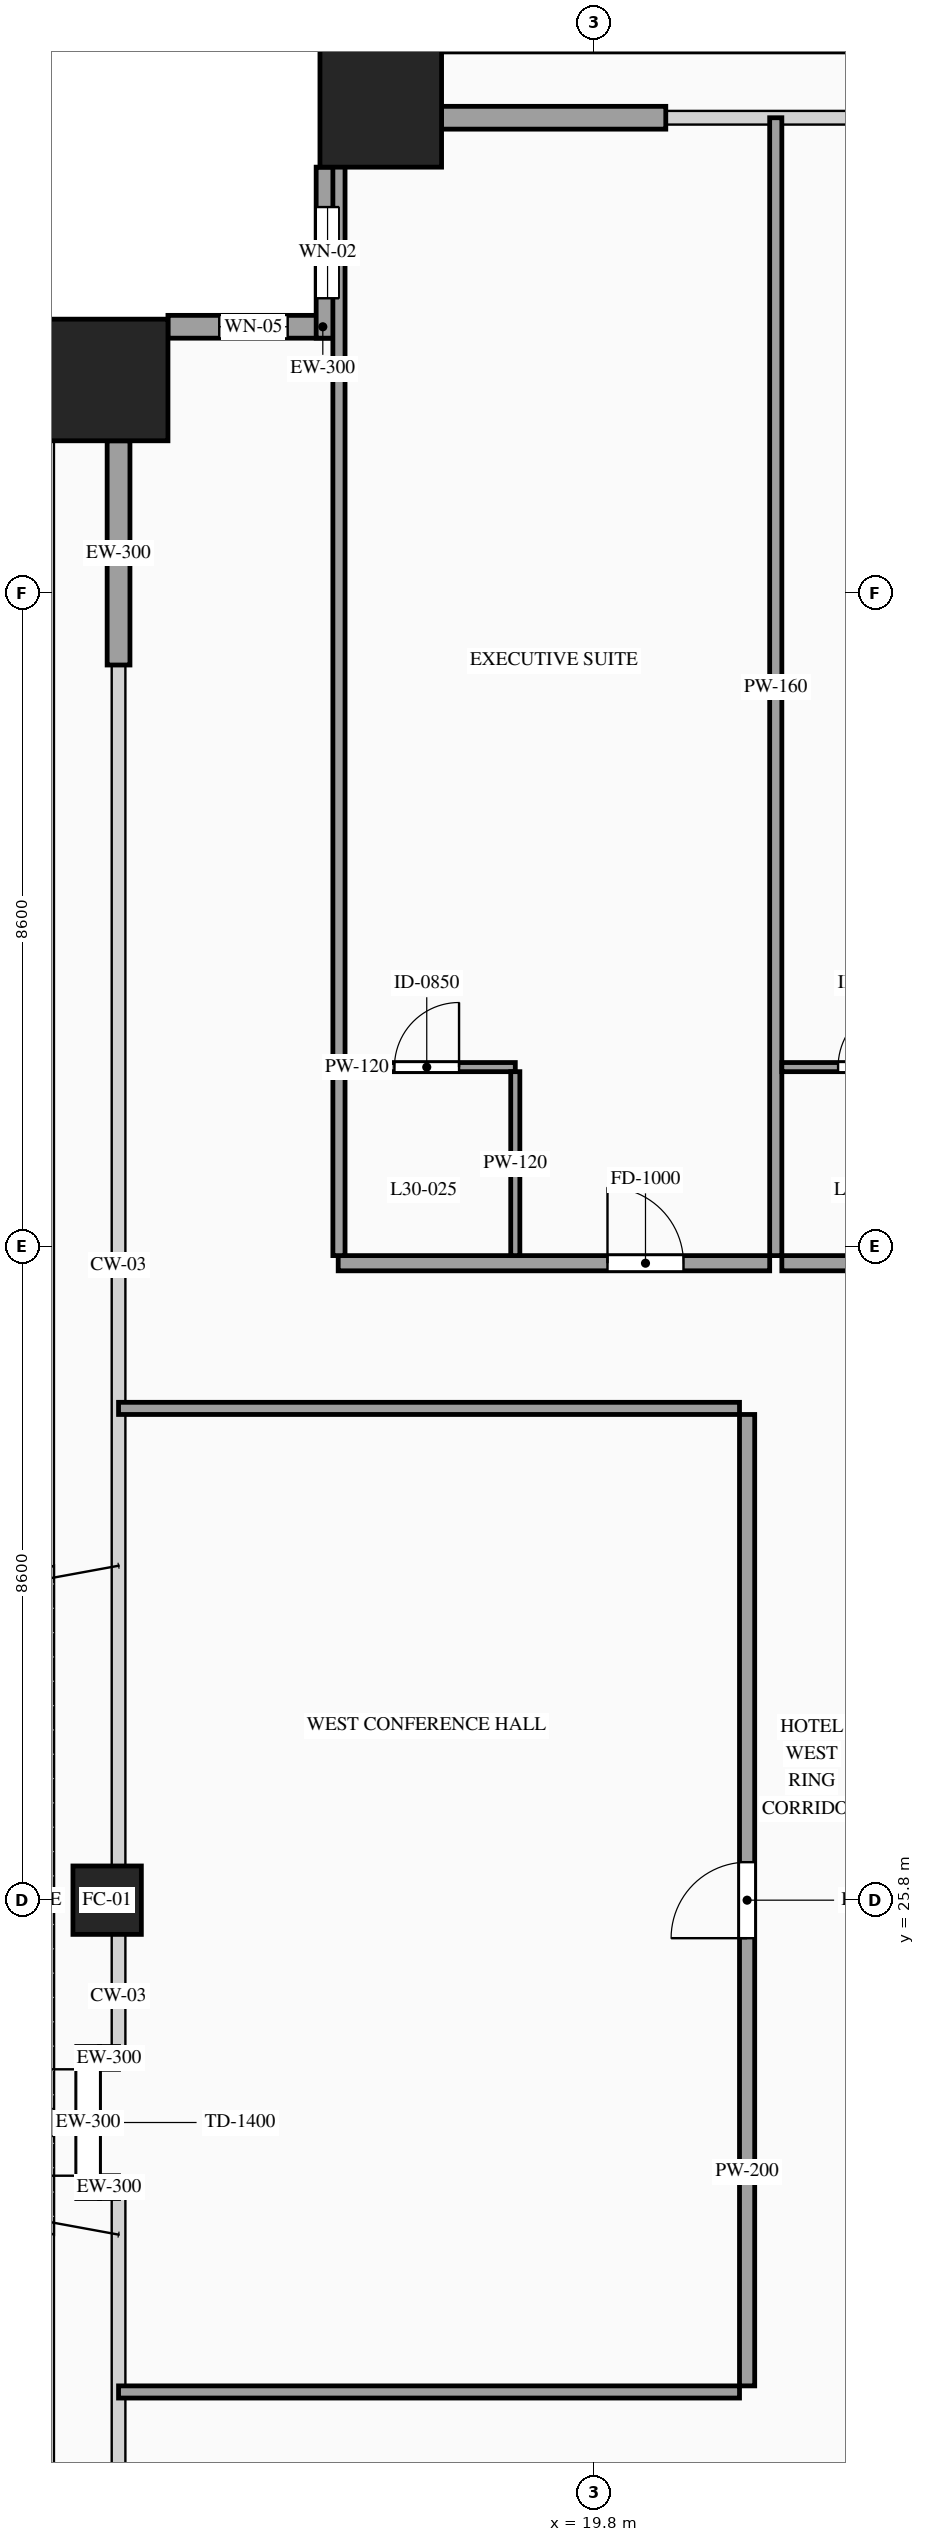
"""IFC4 building model, lengths in metres.
Left out: names, types, materials, properties, quantities, classifications, styles, units other than length and angle.
Written with IfcOpenShell. Run it as: python <this file> out.ifc"""

import sys

from ifc_helpers import new_model, si_unit, direction, frame, frame_2d, origin, origin_2d, place, context, subcontext, project, spatial, rectangle, hollow_rectangle, extrude, source, transform, mapped, element, fill, save


model = new_model("IFC4")
c1 = context("Model", 3, precision=1e-05, world=origin(), true_north=direction((0.0, 1.0)))
c2 = subcontext(c1, "Body", "Model", "MODEL_VIEW")
j1 = project(units=[si_unit("LENGTHUNIT", "METRE"), si_unit("PLANEANGLEUNIT", "RADIAN")], contexts=[c1])
p1 = place(None, origin())
s1 = spatial("IfcSite", under=j1, at=p1, CompositionType="ELEMENT")
p2 = place(p1, origin())
s2 = spatial("IfcBuilding", under=s1, at=p2, CompositionType="ELEMENT")
p3 = place(p2, frame((0.0, 0.0, 115.4)))
s3 = spatial("IfcBuildingStorey", under=s2, at=p3, CompositionType="ELEMENT", Elevation=115.4)
m1 = source(origin(), c2, "Body", "SweptSolid", [
    extrude(hollow_rectangle(XDim=1.6, YDim=1.6, WallThickness=0.07, at=origin_2d()), origin(), (0.0, 0.0, 1.0), 3.6),
])
p4 = place(p3, frame((17.0, 49.4, 0.0), z_axis=(0.0, 0.0, 1.0), x_axis=(1.0, 0.0, 0.0)))
e1 = element("IfcColumn", 1, at=p4, inside=s3, PredefinedType="COLUMN", context=c2, shape_type="MappedRepresentation", body=[
    mapped(m1, transform((0.0, 0.0, 0.0), scale=1.0)),
])
m2 = source(origin(), c2, "Body", "SweptSolid", [
    extrude(hollow_rectangle(XDim=0.9, YDim=0.9, WallThickness=0.042, at=origin_2d()), origin(), (0.0, 0.0, 1.0), 3.6),
])
p5 = place(p3, frame((13.4, 25.8, 0.0), z_axis=(0.0, 0.0, 1.0), x_axis=(1.0, 0.0, 0.0)))
e2 = element("IfcColumn", 2, at=p5, inside=s3, PredefinedType="COLUMN", context=c2, shape_type="MappedRepresentation", body=[
    mapped(m2, transform((0.0, 0.0, 0.0), scale=1.0)),
])
p6 = place(p3, frame((13.4, 45.8, 0.0), z_axis=(0.0, 0.0, 1.0), x_axis=(1.0, 0.0, 0.0)))
e3 = element("IfcColumn", 3, at=p6, inside=s3, PredefinedType="COLUMN", context=c2, shape_type="MappedRepresentation", body=[
    mapped(m1, transform((0.0, 0.0, 0.0), scale=1.0)),
])
p7 = place(p3, frame((16.45, 46.5, 0.0), z_axis=(0.0, 0.0, 1.0), x_axis=(-1.0, 0.0, 0.0)))
e4 = element("IfcWall", 4, at=p7, inside=s3, PredefinedType="SOLIDWALL", context=c2, shape_type="SweptSolid", body=[
    extrude(rectangle(XDim=2.25, YDim=0.3, at=frame_2d((1.125, 0.0))), origin(), (0.0, 0.0, 1.0), 3.38),
])
p8 = place(p7, frame((0.675, 0.0, 0.85)))
e5 = element("IfcOpeningElement", 5, at=p8, cuts=e4, PredefinedType="OPENING", context=c2, shape_type="SweptSolid", body=[
    extrude(rectangle(XDim=0.9, YDim=1.5, at=frame_2d((0.45, 0.75))), frame((0.0, 0.165, 0.0), z_axis=(0.0, -1.0, 0.0), x_axis=(1.0, 0.0, 0.0)), (0.0, 0.0, 1.0), 0.33),
])
p9 = place(p3, frame((16.3, 48.6, 0.0), z_axis=(0.0, 0.0, 1.0), x_axis=(0.0, -1.0, 0.0)))
e6 = element("IfcWall", 6, at=p9, inside=s3, PredefinedType="SOLIDWALL", context=c2, shape_type="SweptSolid", body=[
    extrude(rectangle(XDim=2.25, YDim=0.3, at=frame_2d((1.125, 0.0))), origin(), (0.0, 0.0, 1.0), 3.38),
])
p10 = place(p9, frame((0.525, 0.0, 0.85)))
e7 = element("IfcOpeningElement", 7, at=p10, cuts=e6, PredefinedType="OPENING", context=c2, shape_type="SweptSolid", body=[
    extrude(rectangle(XDim=1.2, YDim=2.1, at=frame_2d((0.6, 1.05))), frame((0.0, 0.165, 0.0), z_axis=(0.0, -1.0, 0.0), x_axis=(1.0, 0.0, 0.0)), (0.0, 0.0, 1.0), 0.33),
])
m3 = source(origin(), c2, "Body", "SweptSolid", [
    extrude(rectangle(XDim=2.95, YDim=0.3, at=frame_2d((1.475, 0.0))), origin(), (0.0, 0.0, 1.0), 2.775),
])
for number, where, z_axis, x_axis in (
    (8, (17.8, 49.25, 0.0), (0.0, 0.0, 1.0), (1.0, 0.0, 0.0)),
    (9, (13.55, 42.05, 0.0), (0.0, 0.0, 1.0), (0.0, 1.0, 0.0)),
):
    element("IfcWall", number, at=place(p3, frame(where, z_axis=z_axis, x_axis=x_axis)), inside=s3, PredefinedType="SOLIDWALL", context=c2, shape_type="MappedRepresentation", body=[
        mapped(m3, transform((0.0, 0.0, 0.0), scale=1.0)),
    ])
p11 = place(p3, frame((13.15, 21.875, 0.0), z_axis=(0.0, 0.0, 1.0), x_axis=(0.0, 1.0, 0.0)))
e10 = element("IfcWall", 10, at=p11, inside=s3, PredefinedType="SOLIDWALL", context=c2, shape_type="SweptSolid", body=[
    extrude(rectangle(XDim=2.0, YDim=0.3, at=frame_2d((1.0, 0.0))), origin(), (0.0, 0.0, 1.0), 3.38),
])
p12 = place(p11, frame((0.3, 0.0, 0.0)))
e11 = element("IfcOpeningElement", 11, at=p12, cuts=e10, PredefinedType="OPENING", context=c2, shape_type="SweptSolid", body=[
    extrude(rectangle(XDim=1.4, YDim=2.3, at=frame_2d((0.7, 1.15))), frame((0.0, 0.165, 0.0), z_axis=(0.0, -1.0, 0.0), x_axis=(1.0, 0.0, 0.0)), (0.0, 0.0, 1.0), 0.33),
])
m4 = source(origin(), c2, "Body", "SweptSolid", [
    extrude(rectangle(XDim=0.25, YDim=0.3, at=frame_2d((0.125, 0.0))), origin(), (0.0, 0.0, 1.0), 3.38),
])
for number, where, z_axis, x_axis in (
    (12, (13.55, 22.025, 0.0), (0.0, 0.0, 1.0), (-1.0, 0.0, 0.0)),
    (13, (13.3, 23.725, 0.0), (0.0, 0.0, 1.0), (1.0, 0.0, 0.0)),
):
    element("IfcWall", number, at=place(p3, frame(where, z_axis=z_axis, x_axis=x_axis)), inside=s3, PredefinedType="SOLIDWALL", context=c2, shape_type="MappedRepresentation", body=[
        mapped(m4, transform((0.0, 0.0, 0.0), scale=1.0)),
    ])
p13 = place(p3, frame((16.44, 34.18, 0.0), z_axis=(0.0, 0.0, 1.0), x_axis=(1.0, 0.0, 0.0)))
e14 = element("IfcWall", 14, at=p13, inside=s3, PredefinedType="PARTITIONING", context=c2, shape_type="SweptSolid", body=[
    extrude(rectangle(XDim=5.677, YDim=0.2, at=frame_2d((2.838, 0.0))), origin(), (0.0, 0.0, 1.0), 3.38),
])
p14 = place(p13, frame((3.543, 0.0, 0.0)))
e15 = element("IfcOpeningElement", 15, at=p14, cuts=e14, PredefinedType="OPENING", context=c2, shape_type="SweptSolid", body=[
    extrude(rectangle(XDim=1.0, YDim=2.2, at=frame_2d((0.5, 1.1))), frame((0.0, 0.115, 0.0), z_axis=(0.0, -1.0, 0.0), x_axis=(1.0, 0.0, 0.0)), (0.0, 0.0, 1.0), 0.23),
])
m5 = source(origin(), c2, "Body", "SweptSolid", [
    extrude(rectangle(XDim=14.97, YDim=0.16, at=frame_2d((7.485, 0.0))), origin(), (0.0, 0.0, 1.0), 3.38),
])
p15 = place(p3, frame((22.197, 34.28, 0.0), z_axis=(0.0, 0.0, 1.0), x_axis=(0.0, 1.0, 0.0)))
e16 = element("IfcWall", 16, at=p15, inside=s3, PredefinedType="PARTITIONING", context=c2, shape_type="MappedRepresentation", body=[
    mapped(m5, transform((0.0, 0.0, 0.0), scale=1.0)),
])
p16 = place(p3, frame((16.44, 36.76, 0.0), z_axis=(0.0, 0.0, 1.0), x_axis=(1.0, 0.0, 0.0)))
e17 = element("IfcWall", 17, at=p16, inside=s3, PredefinedType="PARTITIONING", context=c2, shape_type="SweptSolid", body=[
    extrude(rectangle(XDim=2.33, YDim=0.12, at=frame_2d((1.165, 0.0))), origin(), (0.0, 0.0, 1.0), 3.38),
])
p17 = place(p16, frame((0.74, 0.0, 0.0)))
e18 = element("IfcOpeningElement", 18, at=p17, cuts=e17, PredefinedType="OPENING", context=c2, shape_type="SweptSolid", body=[
    extrude(rectangle(XDim=0.85, YDim=2.1, at=frame_2d((0.425, 1.05))), frame((0.0, 0.075, 0.0), z_axis=(0.0, -1.0, 0.0), x_axis=(1.0, 0.0, 0.0)), (0.0, 0.0, 1.0), 0.15),
])
m6 = source(origin(), c2, "Body", "SweptSolid", [
    extrude(rectangle(XDim=2.42, YDim=0.12, at=frame_2d((1.21, 0.0))), origin(), (0.0, 0.0, 1.0), 3.38),
])
p18 = place(p3, frame((18.77, 34.28, 0.0), z_axis=(0.0, 0.0, 1.0), x_axis=(0.0, 1.0, 0.0)))
e19 = element("IfcWall", 19, at=p18, inside=s3, PredefinedType="PARTITIONING", context=c2, shape_type="MappedRepresentation", body=[
    mapped(m6, transform((0.0, 0.0, 0.0), scale=1.0)),
])
p19 = place(p3, frame((22.277, 34.18, 0.0), z_axis=(0.0, 0.0, 1.0), x_axis=(1.0, 0.0, 0.0)))
e20 = element("IfcWall", 20, at=p19, inside=s3, PredefinedType="PARTITIONING", context=c2, shape_type="SweptSolid", body=[
    extrude(rectangle(XDim=9.023, YDim=0.2, at=frame_2d((4.511, 0.0))), origin(), (0.0, 0.0, 1.0), 3.38),
])
p20 = place(p19, frame((5.217, 0.0, 0.0)))
e21 = element("IfcOpeningElement", 21, at=p20, cuts=e20, PredefinedType="OPENING", context=c2, shape_type="SweptSolid", body=[
    extrude(rectangle(XDim=1.0, YDim=2.2, at=frame_2d((0.5, 1.1))), frame((0.0, 0.115, 0.0), z_axis=(0.0, -1.0, 0.0), x_axis=(1.0, 0.0, 0.0)), (0.0, 0.0, 1.0), 0.23),
])
p21 = place(p3, frame((22.277, 36.76, 0.0), z_axis=(0.0, 0.0, 1.0), x_axis=(1.0, 0.0, 0.0)))
e22 = element("IfcWall", 22, at=p21, inside=s3, PredefinedType="PARTITIONING", context=c2, shape_type="SweptSolid", body=[
    extrude(rectangle(XDim=2.33, YDim=0.12, at=frame_2d((1.165, 0.0))), origin(), (0.0, 0.0, 1.0), 3.38),
])
p22 = place(p21, frame((0.74, 0.0, 0.0)))
e23 = element("IfcOpeningElement", 23, at=p22, cuts=e22, PredefinedType="OPENING", context=c2, shape_type="SweptSolid", body=[
    extrude(rectangle(XDim=0.85, YDim=2.1, at=frame_2d((0.425, 1.05))), frame((0.0, 0.075, 0.0), z_axis=(0.0, -1.0, 0.0), x_axis=(1.0, 0.0, 0.0)), (0.0, 0.0, 1.0), 0.15),
])
m7 = source(origin(), c2, "Body", "SweptSolid", [
    extrude(rectangle(XDim=14.82, YDim=0.16, at=frame_2d((7.41, 0.0))), origin(), (0.0, 0.0, 1.0), 3.38),
])
p23 = place(p3, frame((16.45, 34.28, 0.0), z_axis=(0.0, 0.0, 1.0), x_axis=(0.0, 1.0, 0.0)))
e24 = element("IfcWall", 24, at=p23, inside=s3, PredefinedType="PARTITIONING", context=c2, shape_type="MappedRepresentation", body=[
    mapped(m7, transform((0.0, 0.0, 0.0), scale=1.0)),
])
p24 = place(p3, frame((21.82, 19.41, 0.0), z_axis=(0.0, 0.0, 1.0), x_axis=(0.0, 1.0, 0.0)))
e25 = element("IfcWall", 25, at=p24, inside=s3, PredefinedType="PARTITIONING", context=c2, shape_type="SweptSolid", body=[
    extrude(rectangle(XDim=12.78, YDim=0.2, at=frame_2d((6.39, 0.0))), origin(), (0.0, 0.0, 1.0), 3.38),
])
p25 = place(p24, frame((5.89, 0.0, 0.0)))
e26 = element("IfcOpeningElement", 26, at=p25, cuts=e25, PredefinedType="OPENING", context=c2, shape_type="SweptSolid", body=[
    extrude(rectangle(XDim=1.0, YDim=2.2, at=frame_2d((0.5, 1.1))), frame((0.0, 0.115, 0.0), z_axis=(0.0, -1.0, 0.0), x_axis=(1.0, 0.0, 0.0)), (0.0, 0.0, 1.0), 0.23),
])
m8 = source(origin(), c2, "Body", "SweptSolid", [
    extrude(rectangle(XDim=8.17, YDim=0.16, at=frame_2d((4.085, 0.0))), origin(), (0.0, 0.0, 1.0), 2.875),
])
for number, where, z_axis, x_axis in (
    (27, (13.55, 19.33, 0.0), (0.0, 0.0, 1.0), (1.0, 0.0, 0.0)),
    (28, (13.55, 32.27, 0.0), (0.0, 0.0, 1.0), (1.0, 0.0, 0.0)),
):
    element("IfcWall", number, at=place(p3, frame(where, z_axis=z_axis, x_axis=x_axis)), inside=s3, PredefinedType="PARTITIONING", context=c2, shape_type="MappedRepresentation", body=[
        mapped(m8, transform((0.0, 0.0, 0.0), scale=1.0)),
    ])
m9 = source(origin(), c2, "Body", "SweptSolid", [
    extrude(rectangle(XDim=0.9, YDim=1.5, at=frame_2d((0.45, 0.75))), frame((0.0, 0.03, 0.0), z_axis=(0.0, -1.0, 0.0), x_axis=(1.0, 0.0, 0.0)), (0.0, 0.0, 1.0), 0.06),
])
p26 = place(p8, origin())
e29 = element("IfcWindow", 29, at=p26, inside=s3, PartitioningType="SINGLE_PANEL", PredefinedType="WINDOW", context=c2, shape_type="MappedRepresentation", body=[
    mapped(m9, transform((0.0, 0.0, 0.0), scale=1.0)),
])
fill(e5, e29)
m10 = source(origin(), c2, "Body", "SweptSolid", [
    extrude(rectangle(XDim=1.2, YDim=2.1, at=frame_2d((0.6, 1.05))), frame((0.0, 0.03, 0.0), z_axis=(0.0, -1.0, 0.0), x_axis=(1.0, 0.0, 0.0)), (0.0, 0.0, 1.0), 0.06),
])
p27 = place(p10, origin())
e30 = element("IfcWindow", 30, at=p27, inside=s3, PartitioningType="SINGLE_PANEL", PredefinedType="WINDOW", context=c2, shape_type="MappedRepresentation", body=[
    mapped(m10, transform((0.0, 0.0, 0.0), scale=1.0)),
])
fill(e7, e30)
m11 = source(origin(), c2, "Body", "SweptSolid", [
    extrude(rectangle(XDim=1.4, YDim=2.3, at=frame_2d((0.7, 1.15))), frame((0.0, 0.025, 0.0), z_axis=(0.0, -1.0, 0.0), x_axis=(1.0, 0.0, 0.0)), (0.0, 0.0, 1.0), 0.05),
])
p28 = place(p12, origin())
e31 = element("IfcDoor", 31, at=p28, inside=s3, OperationType="DOUBLE_DOOR_SINGLE_SWING", PredefinedType="DOOR", context=c2, shape_type="MappedRepresentation", body=[
    mapped(m11, transform((0.0, 0.0, 0.0), scale=1.0)),
])
fill(e11, e31)
m12 = source(origin(), c2, "Body", "SweptSolid", [
    extrude(rectangle(XDim=1.0, YDim=2.2, at=frame_2d((0.5, 1.1))), frame((0.0, 0.025, 0.0), z_axis=(0.0, -1.0, 0.0), x_axis=(1.0, 0.0, 0.0)), (0.0, 0.0, 1.0), 0.05),
])
p29 = place(p14, origin())
e32 = element("IfcDoor", 32, at=p29, inside=s3, OperationType="SINGLE_SWING_LEFT", PredefinedType="DOOR", context=c2, shape_type="MappedRepresentation", body=[
    mapped(m12, transform((0.0, 0.0, 0.0), scale=1.0)),
])
fill(e15, e32)
m13 = source(origin(), c2, "Body", "SweptSolid", [
    extrude(rectangle(XDim=0.85, YDim=2.1, at=frame_2d((0.425, 1.05))), frame((0.0, 0.025, 0.0), z_axis=(0.0, -1.0, 0.0), x_axis=(1.0, 0.0, 0.0)), (0.0, 0.0, 1.0), 0.05),
])
p30 = place(p17, origin())
e33 = element("IfcDoor", 33, at=p30, inside=s3, OperationType="SINGLE_SWING_RIGHT", PredefinedType="DOOR", context=c2, shape_type="MappedRepresentation", body=[
    mapped(m13, transform((0.0, 0.0, 0.0), scale=1.0)),
])
fill(e18, e33)
p31 = place(p22, origin())
e34 = element("IfcDoor", 34, at=p31, inside=s3, OperationType="SINGLE_SWING_RIGHT", PredefinedType="DOOR", context=c2, shape_type="MappedRepresentation", body=[
    mapped(m13, transform((0.0, 0.0, 0.0), scale=1.0)),
])
fill(e23, e34)
p32 = place(p25, origin())
e35 = element("IfcDoor", 35, at=p32, inside=s3, OperationType="SINGLE_SWING_LEFT", PredefinedType="DOOR", context=c2, shape_type="MappedRepresentation", body=[
    mapped(m12, transform((0.0, 0.0, 0.0), scale=1.0)),
])
fill(e26, e35)
save(model, sys.argv[1])
